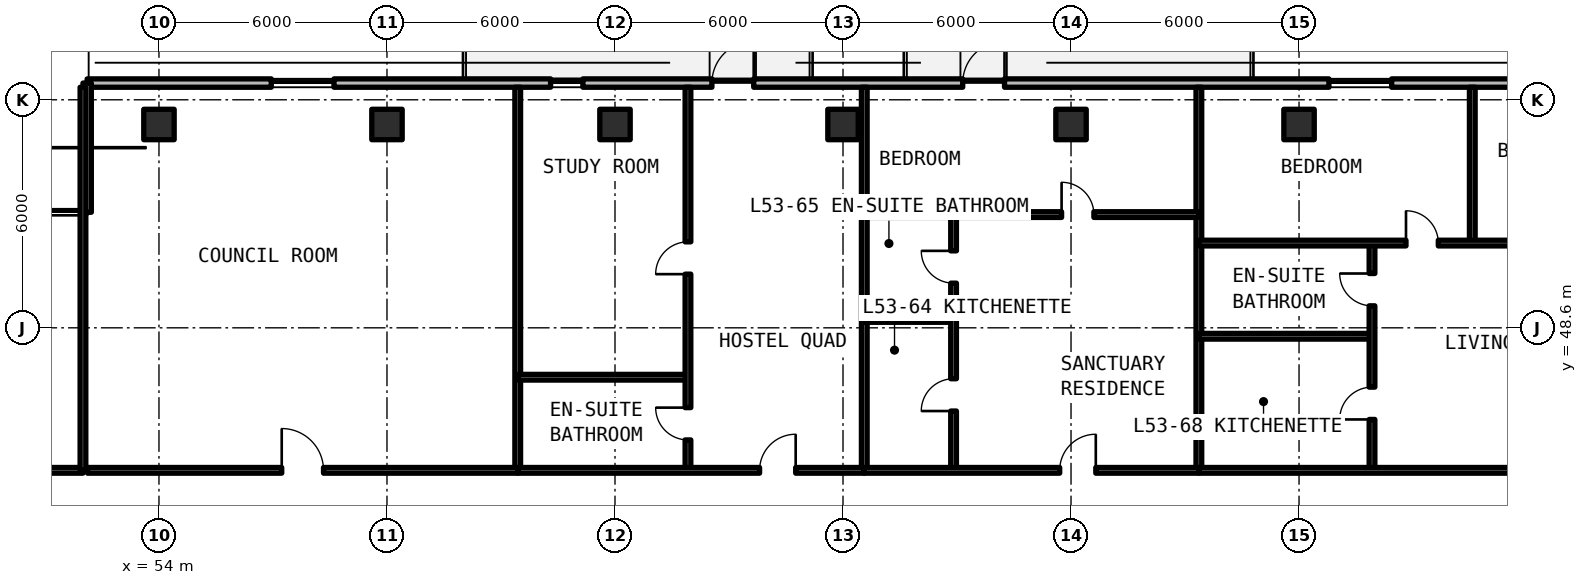
"""IFC4 building model, lengths in metres.
Left out: names, types, materials, properties, quantities, classifications, styles, units other than length and angle.
Written with IfcOpenShell. Run it as: python <this file> out.ifc"""

import sys

from ifc_helpers import new_model, si_unit, direction, frame, frame_2d, origin, origin_2d, place, context, subcontext, project, spatial, rectangle, extrude, element, fill, save


model = new_model("IFC4")
c1 = context("Model", 3, precision=1e-05, world=origin(), true_north=direction((0.0, 1.0)))
c2 = subcontext(c1, "Body", "Model", "MODEL_VIEW")
j1 = project(units=[si_unit("LENGTHUNIT", "METRE"), si_unit("PLANEANGLEUNIT", "RADIAN")], contexts=[c1])
p1 = place(None, origin())
s1 = spatial("IfcSite", under=j1, at=p1, CompositionType="ELEMENT")
p2 = place(p1, origin())
s2 = spatial("IfcBuilding", under=s1, at=p2, CompositionType="ELEMENT")
p3 = place(p2, frame((0.0, 0.0, 191.73)))
s3 = spatial("IfcBuildingStorey", under=s2, at=p3, CompositionType="ELEMENT", Elevation=191.73)
for number, where, z_axis, x_axis in (
    (1, (54.0, 53.95, 0.0), (0.0, 0.0, 1.0), (1.0, 0.0, 0.0)),
    (2, (60.0, 53.95, 0.0), (0.0, 0.0, 1.0), (1.0, 0.0, 0.0)),
    (3, (66.0, 53.95, 0.0), (0.0, 0.0, 1.0), (1.0, 0.0, 0.0)),
    (4, (72.0, 53.95, 0.0), (0.0, 0.0, 1.0), (1.0, 0.0, 0.0)),
    (5, (78.0, 53.95, 0.0), (0.0, 0.0, 1.0), (1.0, 0.0, 0.0)),
    (6, (84.0, 53.95, 0.0), (0.0, 0.0, 1.0), (1.0, 0.0, 0.0)),
):
    element("IfcColumn", number, at=place(p3, frame(where, z_axis=z_axis, x_axis=x_axis)), inside=s3, PredefinedType="COLUMN", context=c2, shape_type="SweptSolid", body=[
        extrude(rectangle(XDim=0.8, YDim=0.8, at=origin_2d()), origin(), (0.0, 0.0, 1.0), 3.3),
    ])
p4 = place(p3, frame((95.354, 55.04, 0.0), z_axis=(0.0, 0.0, 1.0), x_axis=(-1.0, 0.0, 0.0)))
e7 = element("IfcWall", 7, at=p4, inside=s3, PredefinedType="SOLIDWALL", context=c2, shape_type="SweptSolid", body=[
    extrude(rectangle(XDim=43.244, YDim=0.22, at=frame_2d((21.622, 0.0))), origin(), (0.0, 0.0, 1.0), 3.08),
])
p5 = place(p4, frame((25.704, 0.0, 0.0)))
e8 = element("IfcOpeningElement", 8, at=p5, cuts=e7, PredefinedType="OPENING", context=c2, shape_type="SweptSolid", body=[
    extrude(rectangle(XDim=1.1, YDim=2.15, at=frame_2d((0.55, 1.075))), frame((0.0, 0.12, 0.0), z_axis=(0.0, -1.0, 0.0), x_axis=(1.0, 0.0, 0.0)), (0.0, 0.0, 1.0), 0.24),
])
p6 = place(p4, frame((19.104, 0.0, 0.0)))
e9 = element("IfcOpeningElement", 9, at=p6, cuts=e7, PredefinedType="OPENING", context=c2, shape_type="SweptSolid", body=[
    extrude(rectangle(XDim=1.1, YDim=2.15, at=frame_2d((0.55, 1.075))), frame((0.0, 0.12, 0.0), z_axis=(0.0, -1.0, 0.0), x_axis=(1.0, 0.0, 0.0)), (0.0, 0.0, 1.0), 0.24),
])
p7 = place(p4, frame((36.749, 0.0, 0.78)))
e10 = element("IfcOpeningElement", 10, at=p7, cuts=e7, PredefinedType="OPENING", context=c2, shape_type="SweptSolid", body=[
    extrude(rectangle(XDim=1.65, YDim=1.66, at=frame_2d((0.825, 0.83))), frame((0.0, 0.12, 0.0), z_axis=(0.0, -1.0, 0.0), x_axis=(1.0, 0.0, 0.0)), (0.0, 0.0, 1.0), 0.24),
])
p8 = place(p4, frame((30.199, 0.0, 0.78)))
e11 = element("IfcOpeningElement", 11, at=p8, cuts=e7, PredefinedType="OPENING", context=c2, shape_type="SweptSolid", body=[
    extrude(rectangle(XDim=0.85, YDim=1.65, at=frame_2d((0.425, 0.825))), frame((0.0, 0.12, 0.0), z_axis=(0.0, -1.0, 0.0), x_axis=(1.0, 0.0, 0.0)), (0.0, 0.0, 1.0), 0.24),
])
p9 = place(p4, frame((8.918, 0.0, 0.78)))
e12 = element("IfcOpeningElement", 12, at=p9, cuts=e7, PredefinedType="OPENING", context=c2, shape_type="SweptSolid", body=[
    extrude(rectangle(XDim=1.65, YDim=1.66, at=frame_2d((0.825, 0.83))), frame((0.0, 0.12, 0.0), z_axis=(0.0, -1.0, 0.0), x_axis=(1.0, 0.0, 0.0)), (0.0, 0.0, 1.0), 0.24),
])
p10 = place(p4, frame((2.66, 0.0, 0.78)))
e13 = element("IfcOpeningElement", 13, at=p10, cuts=e7, PredefinedType="OPENING", context=c2, shape_type="SweptSolid", body=[
    extrude(rectangle(XDim=1.65, YDim=1.66, at=frame_2d((0.825, 0.83))), frame((0.0, 0.12, 0.0), z_axis=(0.0, -1.0, 0.0), x_axis=(1.0, 0.0, 0.0)), (0.0, 0.0, 1.0), 0.24),
])
p11 = place(p3, frame((52.11, 55.04, 0.0), z_axis=(0.0, 0.0, 1.0), x_axis=(0.0, -1.0, 0.0)))
e14 = element("IfcWall", 14, at=p11, inside=s3, PredefinedType="SOLIDWALL", context=c2, shape_type="SweptSolid", body=[
    extrude(rectangle(XDim=3.4, YDim=0.22, at=frame_2d((1.7, 0.0))), origin(), (0.0, 0.0, 1.0), 3.08),
])
p12 = place(p3, frame((43.6, 44.85, 0.0), z_axis=(0.0, 0.0, 1.0), x_axis=(1.0, 0.0, 0.0)))
e15 = element("IfcWall", 15, at=p12, inside=s3, PredefinedType="SOLIDWALL", context=c2, shape_type="SweptSolid", body=[
    extrude(rectangle(XDim=8.4, YDim=0.15, at=frame_2d((4.2, 0.0))), origin(), (0.0, 0.0, 1.0), 2.35),
])
p13 = place(p12, frame((3.65, 0.0, 0.0)))
e16 = element("IfcOpeningElement", 16, at=p13, cuts=e15, PredefinedType="OPENING", context=c2, shape_type="SweptSolid", body=[
    extrude(rectangle(XDim=1.1, YDim=2.15, at=frame_2d((0.55, 1.075))), frame((0.0, 0.085, 0.0), z_axis=(0.0, -1.0, 0.0), x_axis=(1.0, 0.0, 0.0)), (0.0, 0.0, 1.0), 0.17),
])
for number, where, z_axis, x_axis in (
    (17, (52.0, 44.85, 0.0), (0.0, 0.0, 1.0), (0.0, 1.0, 0.0)),
    (18, (63.44, 44.85, 0.0), (0.0, 0.0, 1.0), (0.0, 1.0, 0.0)),
):
    element("IfcWall", number, at=place(p3, frame(where, z_axis=z_axis, x_axis=x_axis)), inside=s3, PredefinedType="SOLIDWALL", context=c2, shape_type="SweptSolid", body=[
        extrude(rectangle(XDim=10.08, YDim=0.15, at=frame_2d((5.04, 0.0))), origin(), (0.0, 0.0, 1.0), 2.35),
    ])
p14 = place(p3, frame((52.12, 44.85, 0.0), z_axis=(0.0, 0.0, 1.0), x_axis=(1.0, 0.0, 0.0)))
e19 = element("IfcWall", 19, at=p14, inside=s3, PredefinedType="SOLIDWALL", context=c2, shape_type="SweptSolid", body=[
    extrude(rectangle(XDim=11.32, YDim=0.15, at=frame_2d((5.66, 0.0))), origin(), (0.0, 0.0, 1.0), 2.35),
])
p15 = place(p14, frame((5.11, 0.0, 0.0)))
e20 = element("IfcOpeningElement", 20, at=p15, cuts=e19, PredefinedType="OPENING", context=c2, shape_type="SweptSolid", body=[
    extrude(rectangle(XDim=1.1, YDim=2.15, at=frame_2d((0.55, 1.075))), frame((0.0, 0.085, 0.0), z_axis=(0.0, -1.0, 0.0), x_axis=(1.0, 0.0, 0.0)), (0.0, 0.0, 1.0), 0.17),
])
p16 = place(p3, frame((72.559, 44.85, 0.0), z_axis=(0.0, 0.0, 1.0), x_axis=(0.0, 1.0, 0.0)))
e21 = element("IfcWall", 21, at=p16, inside=s3, PredefinedType="SOLIDWALL", context=c2, shape_type="SweptSolid", body=[
    extrude(rectangle(XDim=10.08, YDim=0.15, at=frame_2d((5.04, 0.0))), origin(), (0.0, 0.0, 1.0), 2.35),
])
p17 = place(p3, frame((63.44, 47.3, 0.0), z_axis=(0.0, 0.0, 1.0), x_axis=(1.0, 0.0, 0.0)))
e22 = element("IfcWall", 22, at=p17, inside=s3, PredefinedType="PARTITIONING", context=c2, shape_type="SweptSolid", body=[
    extrude(rectangle(XDim=4.48, YDim=0.15, at=frame_2d((2.24, 0.0))), origin(), (0.0, 0.0, 1.0), 2.35),
])
p18 = place(p3, frame((67.92, 44.85, 0.0), z_axis=(0.0, 0.0, 1.0), x_axis=(0.0, 1.0, 0.0)))
e23 = element("IfcWall", 23, at=p18, inside=s3, PredefinedType="PARTITIONING", context=c2, shape_type="SweptSolid", body=[
    extrude(rectangle(XDim=10.08, YDim=0.15, at=frame_2d((5.04, 0.0))), origin(), (0.0, 0.0, 1.0), 2.35),
])
p19 = place(p18, frame((0.8, 0.0, 0.0)))
e24 = element("IfcOpeningElement", 24, at=p19, cuts=e23, PredefinedType="OPENING", context=c2, shape_type="SweptSolid", body=[
    extrude(rectangle(XDim=0.85, YDim=2.1, at=frame_2d((0.425, 1.05))), frame((0.0, 0.085, 0.0), z_axis=(0.0, -1.0, 0.0), x_axis=(1.0, 0.0, 0.0)), (0.0, 0.0, 1.0), 0.17),
])
p20 = place(p18, frame((5.162, 0.0, 0.0)))
e25 = element("IfcOpeningElement", 25, at=p20, cuts=e23, PredefinedType="OPENING", context=c2, shape_type="SweptSolid", body=[
    extrude(rectangle(XDim=0.85, YDim=2.1, at=frame_2d((0.425, 1.05))), frame((0.0, 0.085, 0.0), z_axis=(0.0, -1.0, 0.0), x_axis=(1.0, 0.0, 0.0)), (0.0, 0.0, 1.0), 0.17),
])
p21 = place(p3, frame((63.44, 44.85, 0.0), z_axis=(0.0, 0.0, 1.0), x_axis=(1.0, 0.0, 0.0)))
e26 = element("IfcWall", 26, at=p21, inside=s3, PredefinedType="SOLIDWALL", context=c2, shape_type="SweptSolid", body=[
    extrude(rectangle(XDim=9.119, YDim=0.15, at=frame_2d((4.56, 0.0))), origin(), (0.0, 0.0, 1.0), 2.35),
])
p22 = place(p21, frame((6.365, 0.0, 0.0)))
e27 = element("IfcOpeningElement", 27, at=p22, cuts=e26, PredefinedType="OPENING", context=c2, shape_type="SweptSolid", body=[
    extrude(rectangle(XDim=0.95, YDim=2.15, at=frame_2d((0.475, 1.075))), frame((0.0, 0.085, 0.0), z_axis=(0.0, -1.0, 0.0), x_axis=(1.0, 0.0, 0.0)), (0.0, 0.0, 1.0), 0.17),
])
p23 = place(p3, frame((81.364, 44.85, 0.0), z_axis=(0.0, 0.0, 1.0), x_axis=(0.0, 1.0, 0.0)))
e28 = element("IfcWall", 28, at=p23, inside=s3, PredefinedType="SOLIDWALL", context=c2, shape_type="SweptSolid", body=[
    extrude(rectangle(XDim=10.08, YDim=0.15, at=frame_2d((5.04, 0.0))), origin(), (0.0, 0.0, 1.0), 2.35),
])
p24 = place(p3, frame((72.559, 48.82, 0.0), z_axis=(0.0, 0.0, 1.0), x_axis=(1.0, 0.0, 0.0)))
e29 = element("IfcWall", 29, at=p24, inside=s3, PredefinedType="PARTITIONING", context=c2, shape_type="SweptSolid", body=[
    extrude(rectangle(XDim=2.35, YDim=0.15, at=frame_2d((1.175, 0.0))), origin(), (0.0, 0.0, 1.0), 2.35),
])
p25 = place(p3, frame((74.909, 44.85, 0.0), z_axis=(0.0, 0.0, 1.0), x_axis=(0.0, 1.0, 0.0)))
e30 = element("IfcWall", 30, at=p25, inside=s3, PredefinedType="PARTITIONING", context=c2, shape_type="SweptSolid", body=[
    extrude(rectangle(XDim=6.729, YDim=0.15, at=frame_2d((3.365, 0.0))), origin(), (0.0, 0.0, 1.0), 2.35),
])
p26 = place(p25, frame((1.56, 0.0, 0.0)))
e31 = element("IfcOpeningElement", 31, at=p26, cuts=e30, PredefinedType="OPENING", context=c2, shape_type="SweptSolid", body=[
    extrude(rectangle(XDim=0.85, YDim=2.1, at=frame_2d((0.425, 1.05))), frame((0.0, 0.085, 0.0), z_axis=(0.0, -1.0, 0.0), x_axis=(1.0, 0.0, 0.0)), (0.0, 0.0, 1.0), 0.17),
])
p27 = place(p25, frame((4.925, 0.0, 0.0)))
e32 = element("IfcOpeningElement", 32, at=p27, cuts=e30, PredefinedType="OPENING", context=c2, shape_type="SweptSolid", body=[
    extrude(rectangle(XDim=0.85, YDim=2.1, at=frame_2d((0.425, 1.05))), frame((0.0, 0.085, 0.0), z_axis=(0.0, -1.0, 0.0), x_axis=(1.0, 0.0, 0.0)), (0.0, 0.0, 1.0), 0.17),
])
p28 = place(p3, frame((72.559, 51.58, 0.0), z_axis=(0.0, 0.0, 1.0), x_axis=(1.0, 0.0, 0.0)))
e33 = element("IfcWall", 33, at=p28, inside=s3, PredefinedType="PARTITIONING", context=c2, shape_type="SweptSolid", body=[
    extrude(rectangle(XDim=8.805, YDim=0.15, at=frame_2d((4.402, 0.0))), origin(), (0.0, 0.0, 1.0), 2.35),
])
p29 = place(p28, frame((5.192, 0.0, 0.0)))
e34 = element("IfcOpeningElement", 34, at=p29, cuts=e33, PredefinedType="OPENING", context=c2, shape_type="SweptSolid", body=[
    extrude(rectangle(XDim=0.85, YDim=2.1, at=frame_2d((0.425, 1.05))), frame((0.0, 0.085, 0.0), z_axis=(0.0, -1.0, 0.0), x_axis=(1.0, 0.0, 0.0)), (0.0, 0.0, 1.0), 0.17),
])
p30 = place(p3, frame((72.559, 44.85, 0.0), z_axis=(0.0, 0.0, 1.0), x_axis=(1.0, 0.0, 0.0)))
e35 = element("IfcWall", 35, at=p30, inside=s3, PredefinedType="SOLIDWALL", context=c2, shape_type="SweptSolid", body=[
    extrude(rectangle(XDim=8.805, YDim=0.15, at=frame_2d((4.402, 0.0))), origin(), (0.0, 0.0, 1.0), 2.35),
])
p31 = place(p30, frame((5.142, 0.0, 0.0)))
e36 = element("IfcOpeningElement", 36, at=p31, cuts=e35, PredefinedType="OPENING", context=c2, shape_type="SweptSolid", body=[
    extrude(rectangle(XDim=0.95, YDim=2.15, at=frame_2d((0.475, 1.075))), frame((0.0, 0.085, 0.0), z_axis=(0.0, -1.0, 0.0), x_axis=(1.0, 0.0, 0.0)), (0.0, 0.0, 1.0), 0.17),
])
p32 = place(p3, frame((81.364, 48.378, 0.0), z_axis=(0.0, 0.0, 1.0), x_axis=(1.0, 0.0, 0.0)))
e37 = element("IfcWall", 37, at=p32, inside=s3, PredefinedType="PARTITIONING", context=c2, shape_type="SweptSolid", body=[
    extrude(rectangle(XDim=4.556, YDim=0.15, at=frame_2d((2.278, 0.0))), origin(), (0.0, 0.0, 1.0), 2.35),
])
p33 = place(p3, frame((85.92, 44.85, 0.0), z_axis=(0.0, 0.0, 1.0), x_axis=(0.0, 1.0, 0.0)))
e38 = element("IfcWall", 38, at=p33, inside=s3, PredefinedType="PARTITIONING", context=c2, shape_type="SweptSolid", body=[
    extrude(rectangle(XDim=5.98, YDim=0.15, at=frame_2d((2.99, 0.0))), origin(), (0.0, 0.0, 1.0), 2.35),
])
p34 = place(p33, frame((1.339, 0.0, 0.0)))
e39 = element("IfcOpeningElement", 39, at=p34, cuts=e38, PredefinedType="OPENING", context=c2, shape_type="SweptSolid", body=[
    extrude(rectangle(XDim=0.85, YDim=2.1, at=frame_2d((0.425, 1.05))), frame((0.0, 0.085, 0.0), z_axis=(0.0, -1.0, 0.0), x_axis=(1.0, 0.0, 0.0)), (0.0, 0.0, 1.0), 0.17),
])
p35 = place(p33, frame((4.329, 0.0, 0.0)))
e40 = element("IfcOpeningElement", 40, at=p35, cuts=e38, PredefinedType="OPENING", context=c2, shape_type="SweptSolid", body=[
    extrude(rectangle(XDim=0.85, YDim=2.1, at=frame_2d((0.425, 1.05))), frame((0.0, 0.085, 0.0), z_axis=(0.0, -1.0, 0.0), x_axis=(1.0, 0.0, 0.0)), (0.0, 0.0, 1.0), 0.17),
])
p36 = place(p3, frame((88.559, 50.83, 0.0), z_axis=(0.0, 0.0, 1.0), x_axis=(0.0, 1.0, 0.0)))
e41 = element("IfcWall", 41, at=p36, inside=s3, PredefinedType="PARTITIONING", context=c2, shape_type="SweptSolid", body=[
    extrude(rectangle(XDim=4.1, YDim=0.15, at=frame_2d((2.05, 0.0))), origin(), (0.0, 0.0, 1.0), 2.35),
])
p37 = place(p3, frame((81.364, 50.83, 0.0), z_axis=(0.0, 0.0, 1.0), x_axis=(1.0, 0.0, 0.0)))
e42 = element("IfcWall", 42, at=p37, inside=s3, PredefinedType="PARTITIONING", context=c2, shape_type="SweptSolid", body=[
    extrude(rectangle(XDim=13.836, YDim=0.15, at=frame_2d((6.918, 0.0))), origin(), (0.0, 0.0, 1.0), 2.35),
])
p38 = place(p37, frame((5.45, 0.0, 0.0)))
e43 = element("IfcOpeningElement", 43, at=p38, cuts=e42, PredefinedType="OPENING", context=c2, shape_type="SweptSolid", body=[
    extrude(rectangle(XDim=0.85, YDim=2.1, at=frame_2d((0.425, 1.05))), frame((0.0, 0.085, 0.0), z_axis=(0.0, -1.0, 0.0), x_axis=(1.0, 0.0, 0.0)), (0.0, 0.0, 1.0), 0.17),
])
p39 = place(p37, frame((10.09, 0.0, 0.0)))
e44 = element("IfcOpeningElement", 44, at=p39, cuts=e42, PredefinedType="OPENING", context=c2, shape_type="SweptSolid", body=[
    extrude(rectangle(XDim=0.85, YDim=2.1, at=frame_2d((0.425, 1.05))), frame((0.0, 0.085, 0.0), z_axis=(0.0, -1.0, 0.0), x_axis=(1.0, 0.0, 0.0)), (0.0, 0.0, 1.0), 0.17),
])
p40 = place(p3, frame((81.364, 44.85, 0.0), z_axis=(0.0, 0.0, 1.0), x_axis=(1.0, 0.0, 0.0)))
e45 = element("IfcWall", 45, at=p40, inside=s3, PredefinedType="SOLIDWALL", context=c2, shape_type="SweptSolid", body=[
    extrude(rectangle(XDim=13.836, YDim=0.15, at=frame_2d((6.918, 0.0))), origin(), (0.0, 0.0, 1.0), 2.35),
])
p41 = place(p40, frame((8.761, 0.0, 0.0)))
e46 = element("IfcOpeningElement", 46, at=p41, cuts=e45, PredefinedType="OPENING", context=c2, shape_type="SweptSolid", body=[
    extrude(rectangle(XDim=0.95, YDim=2.15, at=frame_2d((0.475, 1.075))), frame((0.0, 0.085, 0.0), z_axis=(0.0, -1.0, 0.0), x_axis=(1.0, 0.0, 0.0)), (0.0, 0.0, 1.0), 0.17),
])
p42 = place(p5, frame((1.1, 0.0, 0.0), z_axis=(0.0, 0.0, 1.0), x_axis=(-1.0, 0.0, 0.0)))
e47 = element("IfcDoor", 47, at=p42, inside=s3, OperationType="SINGLE_SWING_RIGHT", PredefinedType="DOOR", context=c2, shape_type="SweptSolid", body=[
    extrude(rectangle(XDim=1.1, YDim=2.15, at=frame_2d((0.55, 1.075))), frame((0.0, 0.025, 0.0), z_axis=(0.0, -1.0, 0.0), x_axis=(1.0, 0.0, 0.0)), (0.0, 0.0, 1.0), 0.05),
])
fill(e8, e47)
p43 = place(p6, frame((1.1, 0.0, 0.0), z_axis=(0.0, 0.0, 1.0), x_axis=(-1.0, 0.0, 0.0)))
e48 = element("IfcDoor", 48, at=p43, inside=s3, OperationType="SINGLE_SWING_LEFT", PredefinedType="DOOR", context=c2, shape_type="SweptSolid", body=[
    extrude(rectangle(XDim=1.1, YDim=2.15, at=frame_2d((0.55, 1.075))), frame((0.0, 0.025, 0.0), z_axis=(0.0, -1.0, 0.0), x_axis=(1.0, 0.0, 0.0)), (0.0, 0.0, 1.0), 0.05),
])
fill(e9, e48)
p44 = place(p7, origin())
e49 = element("IfcWindow", 49, at=p44, inside=s3, PartitioningType="SINGLE_PANEL", PredefinedType="WINDOW", context=c2, shape_type="SweptSolid", body=[
    extrude(rectangle(XDim=1.65, YDim=1.66, at=frame_2d((0.825, 0.83))), frame((0.0, 0.03, 0.0), z_axis=(0.0, -1.0, 0.0), x_axis=(1.0, 0.0, 0.0)), (0.0, 0.0, 1.0), 0.06),
])
fill(e10, e49)
p45 = place(p8, origin())
e50 = element("IfcWindow", 50, at=p45, inside=s3, PartitioningType="SINGLE_PANEL", PredefinedType="WINDOW", context=c2, shape_type="SweptSolid", body=[
    extrude(rectangle(XDim=0.85, YDim=1.65, at=frame_2d((0.425, 0.825))), frame((0.0, 0.03, 0.0), z_axis=(0.0, -1.0, 0.0), x_axis=(1.0, 0.0, 0.0)), (0.0, 0.0, 1.0), 0.06),
])
fill(e11, e50)
p46 = place(p9, origin())
e51 = element("IfcWindow", 51, at=p46, inside=s3, PartitioningType="SINGLE_PANEL", PredefinedType="WINDOW", context=c2, shape_type="SweptSolid", body=[
    extrude(rectangle(XDim=1.65, YDim=1.66, at=frame_2d((0.825, 0.83))), frame((0.0, 0.03, 0.0), z_axis=(0.0, -1.0, 0.0), x_axis=(1.0, 0.0, 0.0)), (0.0, 0.0, 1.0), 0.06),
])
fill(e12, e51)
p47 = place(p15, origin())
e52 = element("IfcDoor", 52, at=p47, inside=s3, OperationType="SINGLE_SWING_LEFT", PredefinedType="DOOR", context=c2, shape_type="SweptSolid", body=[
    extrude(rectangle(XDim=1.1, YDim=2.15, at=frame_2d((0.55, 1.075))), frame((0.0, 0.025, 0.0), z_axis=(0.0, -1.0, 0.0), x_axis=(1.0, 0.0, 0.0)), (0.0, 0.0, 1.0), 0.05),
])
fill(e20, e52)
p48 = place(p19, origin())
e53 = element("IfcDoor", 53, at=p48, inside=s3, OperationType="SINGLE_SWING_RIGHT", PredefinedType="DOOR", context=c2, shape_type="SweptSolid", body=[
    extrude(rectangle(XDim=0.85, YDim=2.1, at=frame_2d((0.425, 1.05))), frame((0.0, 0.025, 0.0), z_axis=(0.0, -1.0, 0.0), x_axis=(1.0, 0.0, 0.0)), (0.0, 0.0, 1.0), 0.05),
])
fill(e24, e53)
p49 = place(p20, origin())
e54 = element("IfcDoor", 54, at=p49, inside=s3, OperationType="SINGLE_SWING_LEFT", PredefinedType="DOOR", context=c2, shape_type="SweptSolid", body=[
    extrude(rectangle(XDim=0.85, YDim=2.1, at=frame_2d((0.425, 1.05))), frame((0.0, 0.025, 0.0), z_axis=(0.0, -1.0, 0.0), x_axis=(1.0, 0.0, 0.0)), (0.0, 0.0, 1.0), 0.05),
])
fill(e25, e54)
p50 = place(p22, origin())
e55 = element("IfcDoor", 55, at=p50, inside=s3, OperationType="SINGLE_SWING_RIGHT", PredefinedType="DOOR", context=c2, shape_type="SweptSolid", body=[
    extrude(rectangle(XDim=0.95, YDim=2.15, at=frame_2d((0.475, 1.075))), frame((0.0, 0.025, 0.0), z_axis=(0.0, -1.0, 0.0), x_axis=(1.0, 0.0, 0.0)), (0.0, 0.0, 1.0), 0.05),
])
fill(e27, e55)
p51 = place(p26, origin())
e56 = element("IfcDoor", 56, at=p51, inside=s3, OperationType="SINGLE_SWING_LEFT", PredefinedType="DOOR", context=c2, shape_type="SweptSolid", body=[
    extrude(rectangle(XDim=0.85, YDim=2.1, at=frame_2d((0.425, 1.05))), frame((0.0, 0.025, 0.0), z_axis=(0.0, -1.0, 0.0), x_axis=(1.0, 0.0, 0.0)), (0.0, 0.0, 1.0), 0.05),
])
fill(e31, e56)
p52 = place(p27, origin())
e57 = element("IfcDoor", 57, at=p52, inside=s3, OperationType="SINGLE_SWING_RIGHT", PredefinedType="DOOR", context=c2, shape_type="SweptSolid", body=[
    extrude(rectangle(XDim=0.85, YDim=2.1, at=frame_2d((0.425, 1.05))), frame((0.0, 0.025, 0.0), z_axis=(0.0, -1.0, 0.0), x_axis=(1.0, 0.0, 0.0)), (0.0, 0.0, 1.0), 0.05),
])
fill(e32, e57)
p53 = place(p29, origin())
e58 = element("IfcDoor", 58, at=p53, inside=s3, OperationType="SINGLE_SWING_LEFT", PredefinedType="DOOR", context=c2, shape_type="SweptSolid", body=[
    extrude(rectangle(XDim=0.85, YDim=2.1, at=frame_2d((0.425, 1.05))), frame((0.0, 0.025, 0.0), z_axis=(0.0, -1.0, 0.0), x_axis=(1.0, 0.0, 0.0)), (0.0, 0.0, 1.0), 0.05),
])
fill(e34, e58)
p54 = place(p31, origin())
e59 = element("IfcDoor", 59, at=p54, inside=s3, OperationType="SINGLE_SWING_RIGHT", PredefinedType="DOOR", context=c2, shape_type="SweptSolid", body=[
    extrude(rectangle(XDim=0.95, YDim=2.15, at=frame_2d((0.475, 1.075))), frame((0.0, 0.025, 0.0), z_axis=(0.0, -1.0, 0.0), x_axis=(1.0, 0.0, 0.0)), (0.0, 0.0, 1.0), 0.05),
])
fill(e36, e59)
p55 = place(p34, origin())
e60 = element("IfcDoor", 60, at=p55, inside=s3, OperationType="SINGLE_SWING_LEFT", PredefinedType="DOOR", context=c2, shape_type="SweptSolid", body=[
    extrude(rectangle(XDim=0.85, YDim=2.1, at=frame_2d((0.425, 1.05))), frame((0.0, 0.025, 0.0), z_axis=(0.0, -1.0, 0.0), x_axis=(1.0, 0.0, 0.0)), (0.0, 0.0, 1.0), 0.05),
])
fill(e39, e60)
p56 = place(p35, origin())
e61 = element("IfcDoor", 61, at=p56, inside=s3, OperationType="SINGLE_SWING_RIGHT", PredefinedType="DOOR", context=c2, shape_type="SweptSolid", body=[
    extrude(rectangle(XDim=0.85, YDim=2.1, at=frame_2d((0.425, 1.05))), frame((0.0, 0.025, 0.0), z_axis=(0.0, -1.0, 0.0), x_axis=(1.0, 0.0, 0.0)), (0.0, 0.0, 1.0), 0.05),
])
fill(e40, e61)
p57 = place(p38, origin())
e62 = element("IfcDoor", 62, at=p57, inside=s3, OperationType="SINGLE_SWING_LEFT", PredefinedType="DOOR", context=c2, shape_type="SweptSolid", body=[
    extrude(rectangle(XDim=0.85, YDim=2.1, at=frame_2d((0.425, 1.05))), frame((0.0, 0.025, 0.0), z_axis=(0.0, -1.0, 0.0), x_axis=(1.0, 0.0, 0.0)), (0.0, 0.0, 1.0), 0.05),
])
fill(e43, e62)
save(model, sys.argv[1])
